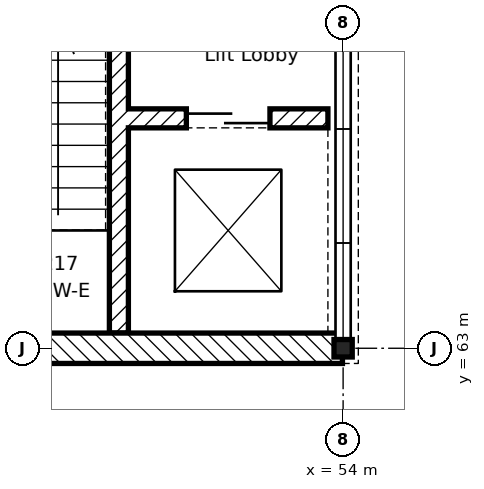
"""IFC4 building model, lengths in metres.
Left out: names, types, materials, properties, quantities, classifications, styles, units other than length and angle.
Written with IfcOpenShell. Run it as: python <this file> out.ifc"""

import sys

from ifc_helpers import new_model, si_unit, direction, frame, frame_2d, origin, origin_2d, place, context, subcontext, project, spatial, rectangle, i_section, extrude, element, fill, save


model = new_model("IFC4")
c1 = context("Model", 3, precision=1e-05, world=origin(), true_north=direction((0.0, 1.0)))
c2 = subcontext(c1, "Body", "Model", "MODEL_VIEW")
j1 = project(units=[si_unit("LENGTHUNIT", "METRE"), si_unit("PLANEANGLEUNIT", "RADIAN")], contexts=[c1])
p1 = place(None, origin())
s1 = spatial("IfcSite", under=j1, at=p1, CompositionType="ELEMENT")
p2 = place(p1, origin())
s2 = spatial("IfcBuilding", under=s1, at=p2, CompositionType="ELEMENT")
p3 = place(p2, frame((0.0, 0.0, 14.4)))
s3 = spatial("IfcBuildingStorey", under=s2, at=p3, CompositionType="ELEMENT", Elevation=14.4)
p4 = place(p3, frame((54.0, 63.0, -0.2), z_axis=(0.0, 0.0, 1.0), x_axis=(1.0, 0.0, 0.0)))
e1 = element("IfcColumn", 1, at=p4, inside=s3, PredefinedType="COLUMN", context=c2, shape_type="SweptSolid", body=[
    extrude(i_section(OverallWidth=0.24, OverallDepth=0.23, WebThickness=0.008, FlangeThickness=0.012, FilletRadius=0.021, at=origin_2d()), origin(), (0.0, 0.0, 1.0), 4.2),
])
p5 = place(p3, frame((51.05, 63.2, 0.0), z_axis=(0.0, 0.0, 1.0), x_axis=(0.0, 1.0, 0.0)))
e2 = element("IfcWall", 2, at=p5, inside=s3, PredefinedType="SHEAR", context=c2, shape_type="SweptSolid", body=[
    extrude(rectangle(XDim=7.225, YDim=0.25, at=frame_2d((3.613, 0.0))), origin(), (0.0, 0.0, 1.0), 4.0),
])
p6 = place(p3, frame((51.175, 66.025, 0.0), z_axis=(0.0, 0.0, 1.0), x_axis=(1.0, 0.0, 0.0)))
e3 = element("IfcWall", 3, at=p6, inside=s3, PredefinedType="SHEAR", context=c2, shape_type="SweptSolid", body=[
    extrude(rectangle(XDim=2.625, YDim=0.25, at=frame_2d((1.312, 0.0))), origin(), (0.0, 0.0, 1.0), 4.0),
])
p7 = place(p6, frame((0.762, 0.0, 0.0)))
e4 = element("IfcOpeningElement", 4, at=p7, cuts=e3, PredefinedType="OPENING", context=c2, shape_type="SweptSolid", body=[
    extrude(rectangle(XDim=1.1, YDim=2.1, at=frame_2d((0.55, 1.05))), frame((0.0, 0.135, 0.0), z_axis=(0.0, -1.0, 0.0), x_axis=(1.0, 0.0, 0.0)), (0.0, 0.0, 1.0), 0.27),
])
p8 = place(p3, frame((53.991, 63.0, 0.0), z_axis=(0.0, 0.0, 1.0), x_axis=(-1.0, 0.0, 0.0)))
e5 = element("IfcWall", 5, at=p8, inside=s3, PredefinedType="STANDARD", context=c2, shape_type="SweptSolid", body=[
    extrude(rectangle(XDim=8.982, YDim=0.4, at=frame_2d((4.491, 0.0))), origin(), (0.0, 0.0, 1.0), 3.6),
])
p9 = place(p8, frame((6.891, 0.0, 0.9)))
e6 = element("IfcOpeningElement", 6, at=p9, cuts=e5, PredefinedType="OPENING", context=c2, shape_type="SweptSolid", body=[
    extrude(rectangle(XDim=1.2, YDim=2.4, at=frame_2d((0.6, 1.2))), frame((0.0, 0.21, 0.0), z_axis=(0.0, -1.0, 0.0), x_axis=(1.0, 0.0, 0.0)), (0.0, 0.0, 1.0), 0.42),
])
p10 = place(p8, frame((3.891, 0.0, 0.9)))
e7 = element("IfcOpeningElement", 7, at=p10, cuts=e5, PredefinedType="OPENING", context=c2, shape_type="SweptSolid", body=[
    extrude(rectangle(XDim=1.2, YDim=2.5, at=frame_2d((0.6, 1.25))), frame((0.0, 0.21, 0.0), z_axis=(0.0, -1.0, 0.0), x_axis=(1.0, 0.0, 0.0)), (0.0, 0.0, 1.0), 0.42),
])
p11 = place(p7, origin())
e8 = element("IfcDoor", 8, at=p11, inside=s3, OperationType="SLIDING_TO_LEFT", PredefinedType="DOOR", context=c2, shape_type="SweptSolid", body=[
    extrude(rectangle(XDim=1.1, YDim=2.1, at=frame_2d((0.55, 1.05))), frame((0.0, 0.025, 0.0), z_axis=(0.0, -1.0, 0.0), x_axis=(1.0, 0.0, 0.0)), (0.0, 0.0, 1.0), 0.05),
])
fill(e4, e8)
save(model, sys.argv[1])
